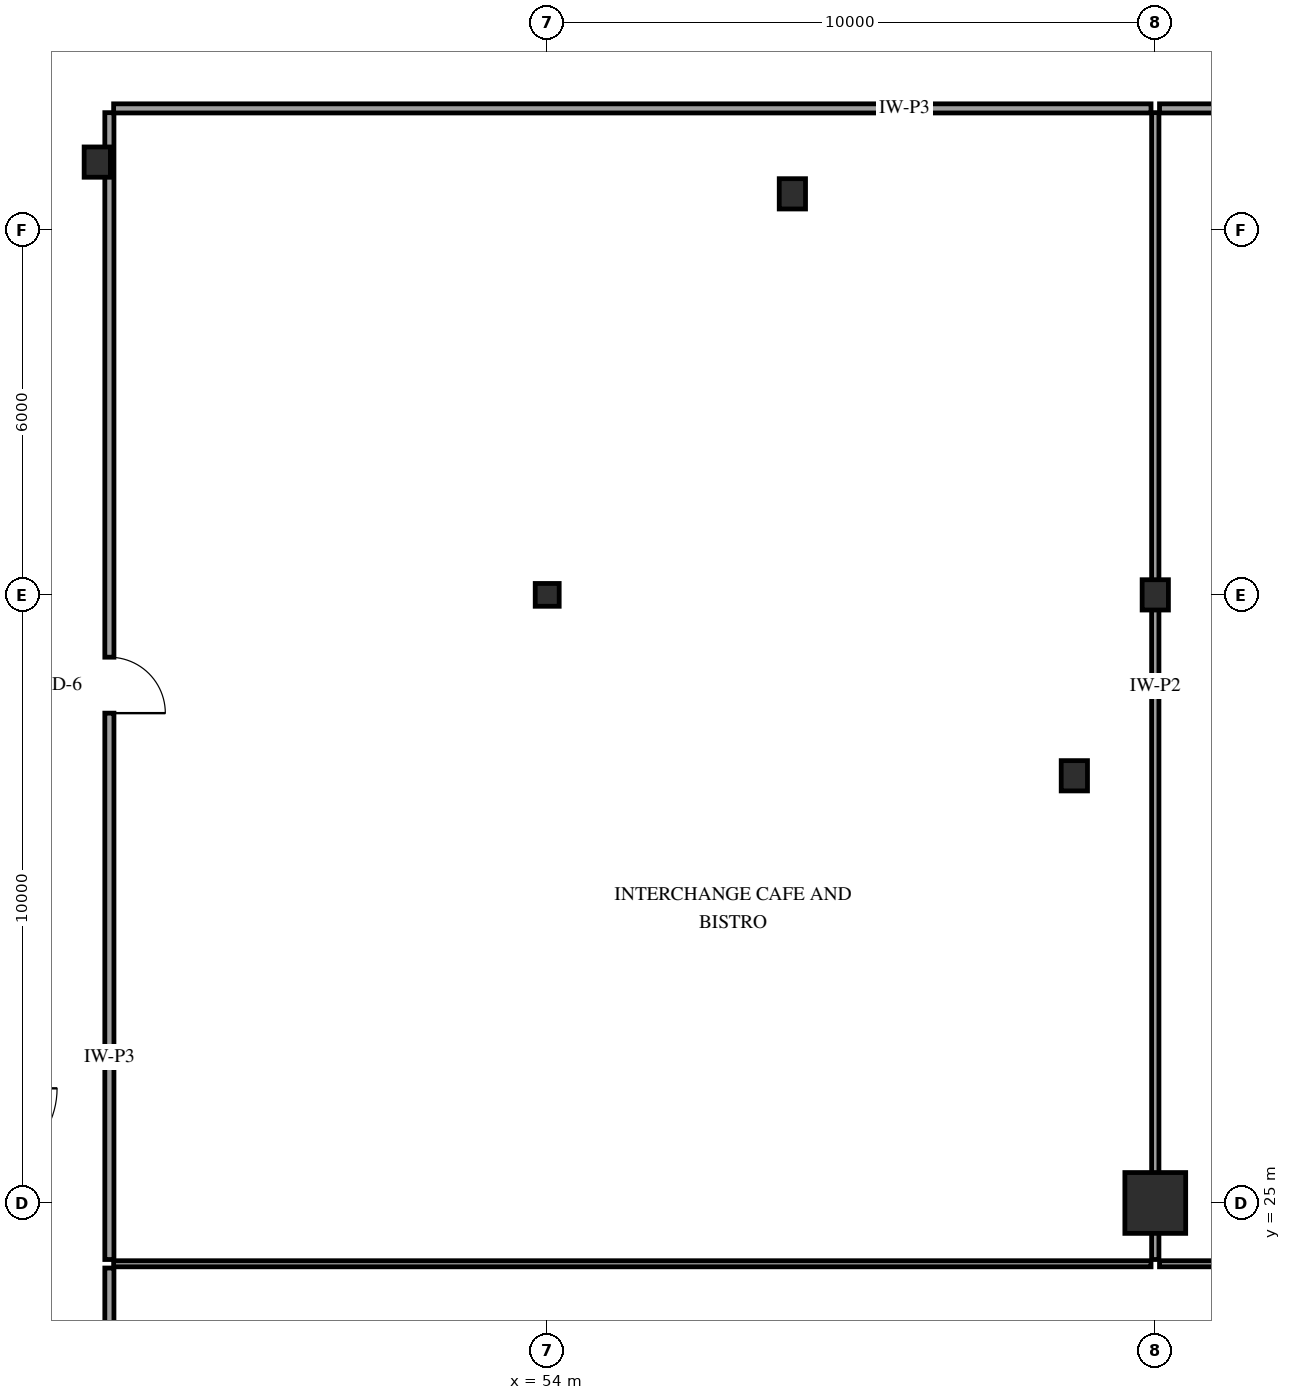
"""IFC4 building model, lengths in metres.
Left out: names, types, materials, properties, quantities, classifications, styles, units other than length and angle.
Written with IfcOpenShell. Run it as: python <this file> out.ifc"""

import sys

from ifc_helpers import new_model, si_unit, direction, frame, frame_2d, origin, origin_2d, place, context, subcontext, project, spatial, rectangle, i_section, extrude, element, fill, save


model = new_model("IFC4")
c1 = context("Model", 3, precision=1e-05, world=origin(), true_north=direction((0.0, 1.0)))
c2 = subcontext(c1, "Body", "Model", "MODEL_VIEW")
j1 = project(units=[si_unit("LENGTHUNIT", "METRE"), si_unit("PLANEANGLEUNIT", "RADIAN")], contexts=[c1])
p1 = place(None, origin())
s1 = spatial("IfcSite", under=j1, at=p1, CompositionType="ELEMENT")
p2 = place(p1, origin())
s2 = spatial("IfcBuilding", under=s1, at=p2, CompositionType="ELEMENT")
p3 = place(p2, frame((0.0, 0.0, 20.7)))
s3 = spatial("IfcBuildingStorey", under=s2, at=p3, CompositionType="ELEMENT", Elevation=20.7)
p4 = place(p3, frame((64.0, 35.0, 0.0), z_axis=(0.0, 0.0, 1.0), x_axis=(1.0, 0.0, 0.0)))
e1 = element("IfcColumn", 1, at=p4, inside=s3, PredefinedType="COLUMN", context=c2, shape_type="SweptSolid", body=[
    extrude(i_section(OverallWidth=0.432, OverallDepth=0.498, WebThickness=0.056, FlangeThickness=0.089, FilletRadius=0.038, at=origin_2d()), origin(), (0.0, 0.0, 1.0), 4.5),
])
p5 = place(p3, frame((64.0, 25.0, 0.0), z_axis=(0.0, 0.0, 1.0), x_axis=(1.0, 0.0, 0.0)))
e2 = element("IfcColumn", 2, at=p5, inside=s3, PredefinedType="COLUMN", context=c2, shape_type="SweptSolid", body=[
    extrude(rectangle(XDim=1.0, YDim=1.0, at=origin_2d()), origin(), (0.0, 0.0, 1.0), 4.5),
])
p6 = place(p3, frame((54.0, 35.0, 0.0), z_axis=(0.0, 0.0, 1.0), x_axis=(1.0, 0.0, 0.0)))
e3 = element("IfcColumn", 3, at=p6, inside=s3, PredefinedType="COLUMN", context=c2, shape_type="SweptSolid", body=[
    extrude(i_section(OverallWidth=0.394, OverallDepth=0.375, WebThickness=0.017, FlangeThickness=0.028, FilletRadius=0.038, at=origin_2d()), origin(), (0.0, 0.0, 1.0), 4.5),
])
for number, where, z_axis, x_axis in (
    (4, (62.669, 32.025, 0.0), (0.0, 0.0, 1.0), (1.0, 0.0, 0.0)),
    (5, (58.032, 41.595, 0.0), (0.0, 0.0, 1.0), (1.0, 0.0, 0.0)),
    (6, (46.601, 42.117, 0.0), (0.0, 0.0, 1.0), (1.0, 0.0, 0.0)),
):
    element("IfcColumn", number, at=place(p3, frame(where, z_axis=z_axis, x_axis=x_axis)), inside=s3, PredefinedType="COLUMN", context=c2, shape_type="SweptSolid", body=[
        extrude(i_section(OverallWidth=0.432, OverallDepth=0.498, WebThickness=0.056, FlangeThickness=0.089, FilletRadius=0.038, at=origin_2d()), origin(), (0.0, 0.0, 1.0), 4.5),
    ])
p7 = place(p3, frame((64.07, 24.0, 0.0), z_axis=(0.0, 0.0, 1.0), x_axis=(1.0, 0.0, 0.0)))
e7 = element("IfcWall", 7, at=p7, inside=s3, PredefinedType="PARTITIONING", context=c2, shape_type="SweptSolid", body=[
    extrude(rectangle(XDim=19.93, YDim=0.1, at=frame_2d((9.965, 0.0))), origin(), (0.0, 0.0, 1.0), 4.18),
])
p8 = place(p3, frame((46.8, 42.93, 0.0), z_axis=(0.0, 0.0, 1.0), x_axis=(0.0, -1.0, 0.0)))
e8 = element("IfcWall", 8, at=p8, inside=s3, PredefinedType="PARTITIONING", context=c2, shape_type="SweptSolid", body=[
    extrude(rectangle(XDim=18.86, YDim=0.15, at=frame_2d((9.43, 0.0))), origin(), (0.0, 0.0, 1.0), 4.18),
])
p9 = place(p8, frame((8.955, 0.0, 0.0)))
e9 = element("IfcOpeningElement", 9, at=p9, cuts=e8, PredefinedType="OPENING", context=c2, shape_type="SweptSolid", body=[
    extrude(rectangle(XDim=0.92, YDim=2.12, at=frame_2d((0.46, 1.06))), frame((0.0, 0.085, 0.0), z_axis=(0.0, -1.0, 0.0), x_axis=(1.0, 0.0, 0.0)), (0.0, 0.0, 1.0), 0.17),
])
p10 = place(p3, frame((64.0, 42.93, 0.0), z_axis=(0.0, 0.0, 1.0), x_axis=(0.0, -1.0, 0.0)))
e10 = element("IfcWall", 10, at=p10, inside=s3, PredefinedType="PARTITIONING", context=c2, shape_type="SweptSolid", body=[
    extrude(rectangle(XDim=18.86, YDim=0.12, at=frame_2d((9.43, 0.0))), origin(), (0.0, 0.0, 1.0), 3.302),
])
p11 = place(p3, frame((63.93, 43.0, 0.0), z_axis=(0.0, 0.0, 1.0), x_axis=(-1.0, 0.0, 0.0)))
e11 = element("IfcWall", 11, at=p11, inside=s3, PredefinedType="PARTITIONING", context=c2, shape_type="SweptSolid", body=[
    extrude(rectangle(XDim=17.06, YDim=0.15, at=frame_2d((8.53, 0.0))), origin(), (0.0, 0.0, 1.0), 4.18),
])
p12 = place(p3, frame((46.87, 24.0, 0.0), z_axis=(0.0, 0.0, 1.0), x_axis=(1.0, 0.0, 0.0)))
e12 = element("IfcWall", 12, at=p12, inside=s3, PredefinedType="PARTITIONING", context=c2, shape_type="SweptSolid", body=[
    extrude(rectangle(XDim=17.06, YDim=0.1, at=frame_2d((8.53, 0.0))), origin(), (0.0, 0.0, 1.0), 4.18),
])
p13 = place(p3, frame((46.8, 23.93, 0.0), z_axis=(0.0, 0.0, 1.0), x_axis=(0.0, -1.0, 0.0)))
e13 = element("IfcWall", 13, at=p13, inside=s3, PredefinedType="PARTITIONING", context=c2, shape_type="SweptSolid", body=[
    extrude(rectangle(XDim=12.06, YDim=0.15, at=frame_2d((6.03, 0.0))), origin(), (0.0, 0.0, 1.0), 4.18),
])
p14 = place(p3, frame((72.88, 43.0, 0.0), z_axis=(0.0, 0.0, 1.0), x_axis=(-1.0, 0.0, 0.0)))
e14 = element("IfcWall", 14, at=p14, inside=s3, PredefinedType="PARTITIONING", context=c2, shape_type="SweptSolid", body=[
    extrude(rectangle(XDim=8.81, YDim=0.15, at=frame_2d((4.405, 0.0))), origin(), (0.0, 0.0, 1.0), 4.18),
])
p15 = place(p9, origin())
e15 = element("IfcDoor", 15, at=p15, inside=s3, OperationType="SINGLE_SWING_RIGHT", PredefinedType="DOOR", context=c2, shape_type="SweptSolid", body=[
    extrude(rectangle(XDim=0.92, YDim=2.12, at=frame_2d((0.46, 1.06))), frame((0.0, 0.025, 0.0), z_axis=(0.0, -1.0, 0.0), x_axis=(1.0, 0.0, 0.0)), (0.0, 0.0, 1.0), 0.05),
])
fill(e9, e15)
save(model, sys.argv[1])
